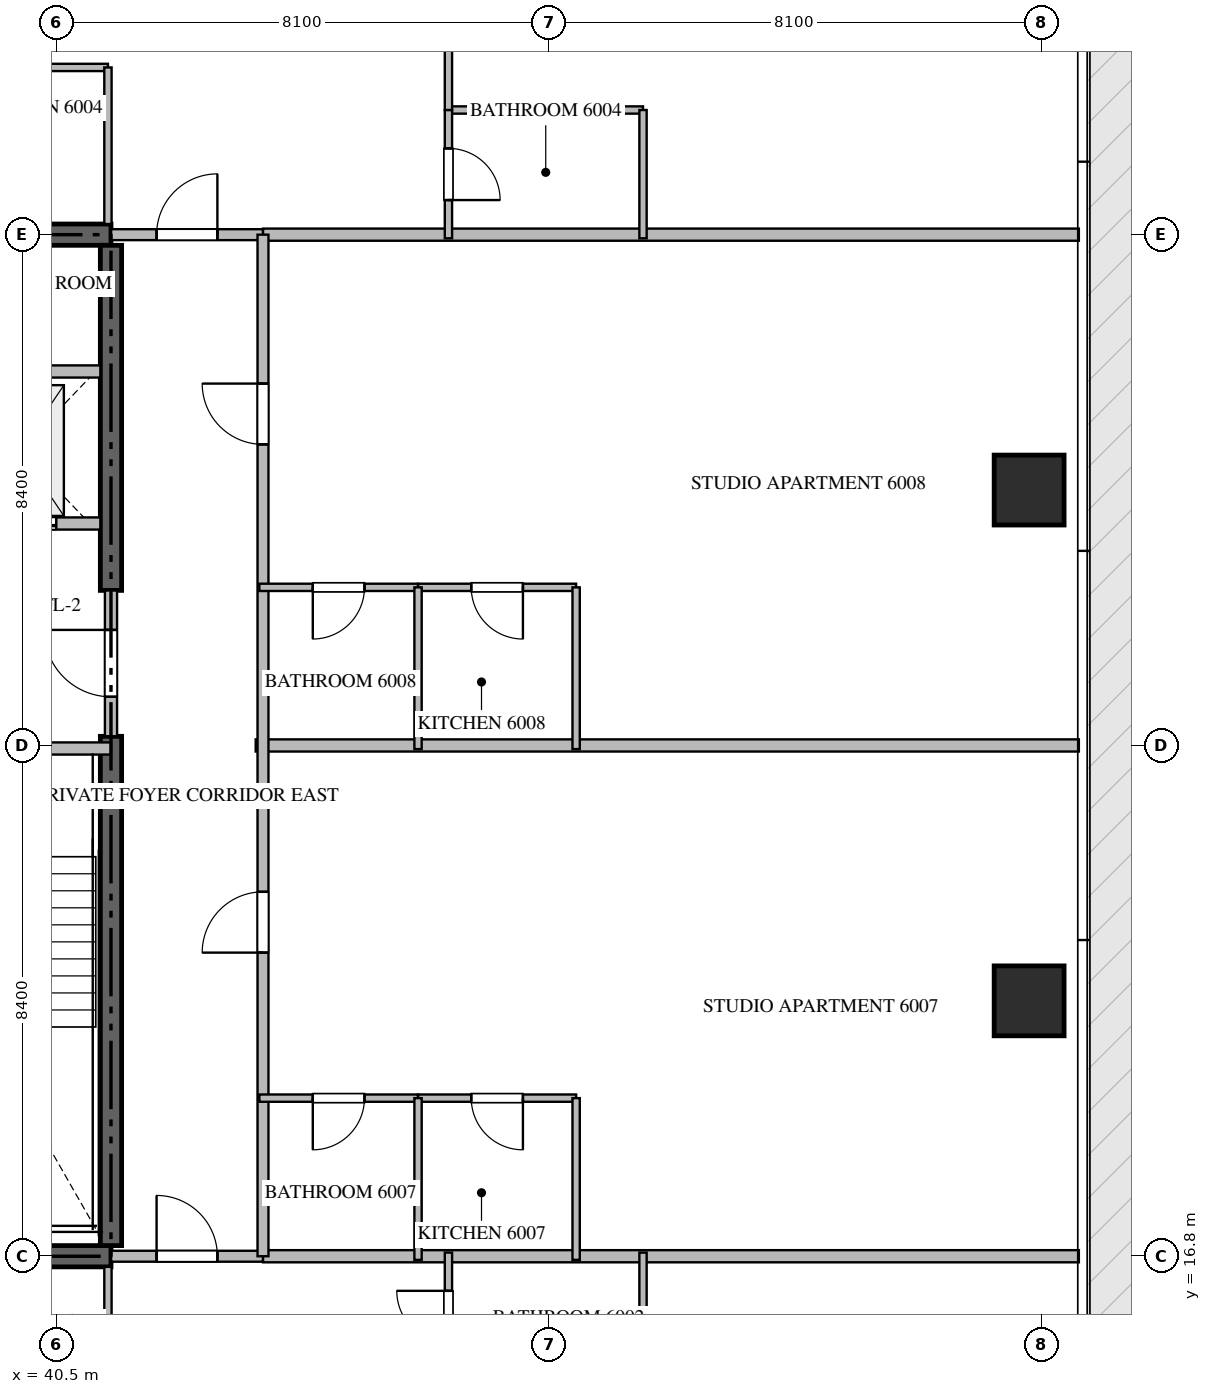
"""IFC4 building model, lengths in metres.
Left out: names, types, materials, properties, quantities, classifications, styles, units other than length and angle.
Written with IfcOpenShell. Run it as: python <this file> out.ifc"""

import sys

from ifc_helpers import new_model, si_unit, direction, frame, frame_2d, origin, origin_2d, place, context, subcontext, project, spatial, rectangle, extrude, source, transform, mapped, element, fill, save


model = new_model("IFC4")
c1 = context("Model", 3, precision=1e-05, world=origin(), true_north=direction((0.0, 1.0)))
c2 = subcontext(c1, "Body", "Model", "MODEL_VIEW")
j1 = project(units=[si_unit("LENGTHUNIT", "METRE"), si_unit("PLANEANGLEUNIT", "RADIAN")], contexts=[c1])
p1 = place(None, origin())
s1 = spatial("IfcSite", under=j1, at=p1, CompositionType="ELEMENT")
p2 = place(p1, origin())
s2 = spatial("IfcBuilding", under=s1, at=p2, CompositionType="ELEMENT")
p3 = place(p2, frame((0.0, 0.0, 241.25)))
s3 = spatial("IfcBuildingStorey", under=s2, at=p3, CompositionType="ELEMENT", Elevation=241.25)
for number, where, z_axis, x_axis in (
    (1, (23.4, 16.8, -0.26), (0.0, 0.0, 1.0), (1.0, 0.0, 0.0)),
    (2, (41.4, 33.6, -0.26), (0.0, 0.0, 1.0), (-1.0, 0.0, 0.0)),
):
    element("IfcWall", number, at=place(p3, frame(where, z_axis=z_axis, x_axis=x_axis)), inside=s3, PredefinedType="SHEAR", context=c2, shape_type="SweptSolid", body=[
        extrude(rectangle(XDim=18.0, YDim=0.35, at=frame_2d((9.0, 0.0))), origin(), (0.0, 0.0, 1.0), 3.848),
    ])
p4 = place(p3, frame((41.4, 16.975, -0.26), z_axis=(0.0, 0.0, 1.0), x_axis=(0.0, 1.0, 0.0)))
e3 = element("IfcWall", 3, at=p4, inside=s3, PredefinedType="SHEAR", context=c2, shape_type="SweptSolid", body=[
    extrude(rectangle(XDim=8.375, YDim=0.35, at=frame_2d((4.188, 0.0))), origin(), (0.0, 0.0, 1.0), 3.848),
])
p5 = place(p3, frame((41.4, 27.75, -0.26), z_axis=(0.0, 0.0, 1.0), x_axis=(0.0, 1.0, 0.0)))
e4 = element("IfcWall", 4, at=p5, inside=s3, PredefinedType="SHEAR", context=c2, shape_type="SweptSolid", body=[
    extrude(rectangle(XDim=5.675, YDim=0.35, at=frame_2d((2.837, 0.0))), origin(), (0.0, 0.0, 1.0), 3.848),
])
m1 = source(origin(), c2, "Body", "SweptSolid", [
    extrude(rectangle(XDim=1.15, YDim=1.15, at=origin_2d()), origin(), (0.0, 0.0, 1.0), 3.85),
])
for number, where, z_axis, x_axis in (
    (5, (56.5, 21.0, -0.26), (0.0, 0.0, 1.0), (1.0, 0.0, 0.0)),
    (6, (56.5, 29.4, -0.26), (0.0, 0.0, 1.0), (1.0, 0.0, 0.0)),
):
    element("IfcColumn", number, at=place(p3, frame(where, z_axis=z_axis, x_axis=x_axis)), inside=s3, PredefinedType="COLUMN", context=c2, shape_type="MappedRepresentation", body=[
        mapped(m1, transform((0.0, 0.0, 0.0), scale=1.0)),
    ])
p6 = place(p3, frame((36.95, 25.15, 0.0), z_axis=(0.0, 0.0, 1.0), x_axis=(1.0, 0.0, 0.0)))
e7 = element("IfcWall", 7, at=p6, inside=s3, PredefinedType="STANDARD", context=c2, shape_type="SweptSolid", body=[
    extrude(rectangle(XDim=4.45, YDim=0.2, at=frame_2d((2.225, 0.0))), origin(), (0.0, 0.0, 1.0), 3.59),
])
p7 = place(p6, frame((1.65, 0.0, 0.0)))
e8 = element("IfcOpeningElement", 8, at=p7, cuts=e7, PredefinedType="OPENING", context=c2, shape_type="SweptSolid", body=[
    extrude(rectangle(XDim=1.1, YDim=2.15, at=frame_2d((0.55, 1.075))), frame((0.0, 0.11, 0.0), z_axis=(0.0, -1.0, 0.0), x_axis=(1.0, 0.0, 0.0)), (0.0, 0.0, 1.0), 0.22),
])
p8 = place(p3, frame((38.75, 28.85, 0.0), z_axis=(0.0, 0.0, 1.0), x_axis=(1.0, 0.0, 0.0)))
e9 = element("IfcWall", 9, at=p8, inside=s3, PredefinedType="STANDARD", context=c2, shape_type="SweptSolid", body=[
    extrude(rectangle(XDim=2.475, YDim=0.2, at=frame_2d((1.238, 0.0))), origin(), (0.0, 0.0, 1.0), 3.59),
])
p9 = place(p8, frame((0.55, 0.0, 0.0)))
e10 = element("IfcOpeningElement", 10, at=p9, cuts=e9, PredefinedType="OPENING", context=c2, shape_type="SweptSolid", body=[
    extrude(rectangle(XDim=1.2, YDim=2.2, at=frame_2d((0.6, 1.1))), frame((0.0, 0.11, 0.0), z_axis=(0.0, -1.0, 0.0), x_axis=(1.0, 0.0, 0.0)), (0.0, 0.0, 1.0), 0.22),
])
p10 = place(p3, frame((38.75, 31.35, 0.0), z_axis=(0.0, 0.0, 1.0), x_axis=(1.0, 0.0, 0.0)))
e11 = element("IfcWall", 11, at=p10, inside=s3, PredefinedType="STANDARD", context=c2, shape_type="SweptSolid", body=[
    extrude(rectangle(XDim=2.475, YDim=0.2, at=frame_2d((1.238, 0.0))), origin(), (0.0, 0.0, 1.0), 3.59),
])
p11 = place(p3, frame((41.4, 25.352, 0.0), z_axis=(0.0, 0.0, 1.0), x_axis=(0.0, 1.0, 0.0)))
e12 = element("IfcWall", 12, at=p11, inside=s3, PredefinedType="STANDARD", context=c2, shape_type="SweptSolid", body=[
    extrude(rectangle(XDim=2.396, YDim=0.2, at=frame_2d((1.198, 0.0))), origin(), (0.0, 0.0, 1.0), 3.59),
])
p12 = place(p11, frame((0.648, 0.0, 0.0)))
e13 = element("IfcOpeningElement", 13, at=p12, cuts=e12, PredefinedType="OPENING", context=c2, shape_type="SweptSolid", body=[
    extrude(rectangle(XDim=1.1, YDim=2.15, at=frame_2d((0.55, 1.075))), frame((0.0, 0.11, 0.0), z_axis=(0.0, -1.0, 0.0), x_axis=(1.0, 0.0, 0.0)), (0.0, 0.0, 1.0), 0.22),
])
p13 = place(p3, frame((43.78, 25.2, 0.0), z_axis=(0.0, 0.0, 1.0), x_axis=(1.0, 0.0, 0.0)))
e14 = element("IfcWall", 14, at=p13, inside=s3, PredefinedType="PARTITIONING", context=c2, shape_type="SweptSolid", body=[
    extrude(rectangle(XDim=13.538, YDim=0.2, at=frame_2d((6.769, 0.0))), origin(), (0.0, 0.0, 1.0), 3.59),
])
for number, where, z_axis, x_axis in (
    (15, (43.9, 16.8, 0.0), (0.0, 0.0, 1.0), (1.0, 0.0, 0.0)),
    (16, (43.9, 33.6, 0.0), (0.0, 0.0, 1.0), (1.0, 0.0, 0.0)),
):
    element("IfcWall", number, at=place(p3, frame(where, z_axis=z_axis, x_axis=x_axis)), inside=s3, PredefinedType="PARTITIONING", context=c2, shape_type="SweptSolid", body=[
        extrude(rectangle(XDim=13.418, YDim=0.2, at=frame_2d((6.709, 0.0))), origin(), (0.0, 0.0, 1.0), 3.59),
    ])
p14 = place(p3, frame((41.402, 16.8, 0.0), z_axis=(0.0, 0.0, 1.0), x_axis=(1.0, 0.0, 0.0)))
e17 = element("IfcWall", 17, at=p14, inside=s3, PredefinedType="PARTITIONING", context=c2, shape_type="SweptSolid", body=[
    extrude(rectangle(XDim=2.496, YDim=0.18, at=frame_2d((1.248, 0.0))), origin(), (0.0, 0.0, 1.0), 3.59),
])
p15 = place(p14, frame((0.748, 0.0, 0.0)))
e18 = element("IfcOpeningElement", 18, at=p15, cuts=e17, PredefinedType="OPENING", context=c2, shape_type="SweptSolid", body=[
    extrude(rectangle(XDim=1.0, YDim=2.15, at=frame_2d((0.5, 1.075))), frame((0.0, 0.1, 0.0), z_axis=(0.0, -1.0, 0.0), x_axis=(1.0, 0.0, 0.0)), (0.0, 0.0, 1.0), 0.2),
])
p16 = place(p3, frame((41.402, 33.6, 0.0), z_axis=(0.0, 0.0, 1.0), x_axis=(1.0, 0.0, 0.0)))
e19 = element("IfcWall", 19, at=p16, inside=s3, PredefinedType="PARTITIONING", context=c2, shape_type="SweptSolid", body=[
    extrude(rectangle(XDim=2.496, YDim=0.18, at=frame_2d((1.248, 0.0))), origin(), (0.0, 0.0, 1.0), 3.59),
])
p17 = place(p16, frame((0.748, 0.0, 0.0)))
e20 = element("IfcOpeningElement", 20, at=p17, cuts=e19, PredefinedType="OPENING", context=c2, shape_type="SweptSolid", body=[
    extrude(rectangle(XDim=1.0, YDim=2.15, at=frame_2d((0.5, 1.075))), frame((0.0, 0.1, 0.0), z_axis=(0.0, -1.0, 0.0), x_axis=(1.0, 0.0, 0.0)), (0.0, 0.0, 1.0), 0.2),
])
p18 = place(p3, frame((43.9, 16.8, 0.0), z_axis=(0.0, 0.0, 1.0), x_axis=(0.0, 1.0, 0.0)))
e21 = element("IfcWall", 21, at=p18, inside=s3, PredefinedType="PARTITIONING", context=c2, shape_type="SweptSolid", body=[
    extrude(rectangle(XDim=16.8, YDim=0.18, at=frame_2d((8.4, 0.0))), origin(), (0.0, 0.0, 1.0), 3.59),
])
p19 = place(p18, frame((4.993, 0.0, 0.0)))
e22 = element("IfcOpeningElement", 22, at=p19, cuts=e21, PredefinedType="OPENING", context=c2, shape_type="SweptSolid", body=[
    extrude(rectangle(XDim=1.0, YDim=2.15, at=frame_2d((0.5, 1.075))), frame((0.0, 0.1, 0.0), z_axis=(0.0, -1.0, 0.0), x_axis=(1.0, 0.0, 0.0)), (0.0, 0.0, 1.0), 0.2),
])
p20 = place(p18, frame((13.351, 0.0, 0.0)))
e23 = element("IfcOpeningElement", 23, at=p20, cuts=e21, PredefinedType="OPENING", context=c2, shape_type="SweptSolid", body=[
    extrude(rectangle(XDim=1.0, YDim=2.15, at=frame_2d((0.5, 1.075))), frame((0.0, 0.1, 0.0), z_axis=(0.0, -1.0, 0.0), x_axis=(1.0, 0.0, 0.0)), (0.0, 0.0, 1.0), 0.2),
])
p21 = place(p3, frame((41.35, 14.05, 0.0), z_axis=(0.0, 0.0, 1.0), x_axis=(0.0, 1.0, 0.0)))
e24 = element("IfcWall", 24, at=p21, inside=s3, PredefinedType="PARTITIONING", context=c2, shape_type="SweptSolid", body=[
    extrude(rectangle(XDim=2.575, YDim=0.12, at=frame_2d((1.288, 0.0))), origin(), (0.0, 0.0, 1.0), 3.59),
])
p22 = place(p3, frame((50.15, 14.75, 0.0), z_axis=(0.0, 0.0, 1.0), x_axis=(0.0, 1.0, 0.0)))
e25 = element("IfcWall", 25, at=p22, inside=s3, PredefinedType="PARTITIONING", context=c2, shape_type="SweptSolid", body=[
    extrude(rectangle(XDim=2.11, YDim=0.12, at=frame_2d((1.055, 0.0))), origin(), (0.0, 0.0, 1.0), 3.59),
])
p23 = place(p3, frame((46.95, 14.752, 0.0), z_axis=(0.0, 0.0, 1.0), x_axis=(0.0, 1.0, 0.0)))
e26 = element("IfcWall", 26, at=p23, inside=s3, PredefinedType="PARTITIONING", context=c2, shape_type="SweptSolid", body=[
    extrude(rectangle(XDim=2.108, YDim=0.12, at=frame_2d((1.054, 0.0))), origin(), (0.0, 0.0, 1.0), 3.59),
])
p24 = place(p23, frame((0.629, 0.0, 0.0)))
e27 = element("IfcOpeningElement", 27, at=p24, cuts=e26, PredefinedType="OPENING", context=c2, shape_type="SweptSolid", body=[
    extrude(rectangle(XDim=0.85, YDim=2.1, at=frame_2d((0.425, 1.05))), frame((0.0, 0.07, 0.0), z_axis=(0.0, -1.0, 0.0), x_axis=(1.0, 0.0, 0.0)), (0.0, 0.0, 1.0), 0.14),
])
p25 = place(p3, frame((38.5, 36.35, 0.0), z_axis=(0.0, 0.0, 1.0), x_axis=(1.0, 0.0, 0.0)))
e28 = element("IfcWall", 28, at=p25, inside=s3, PredefinedType="PARTITIONING", context=c2, shape_type="SweptSolid", body=[
    extrude(rectangle(XDim=2.85, YDim=0.12, at=frame_2d((1.425, 0.0))), origin(), (0.0, 0.0, 1.0), 3.59),
])
p26 = place(p25, frame((1.0, 0.0, 0.0)))
e29 = element("IfcOpeningElement", 29, at=p26, cuts=e28, PredefinedType="OPENING", context=c2, shape_type="SweptSolid", body=[
    extrude(rectangle(XDim=0.85, YDim=2.1, at=frame_2d((0.425, 1.05))), frame((0.0, 0.07, 0.0), z_axis=(0.0, -1.0, 0.0), x_axis=(1.0, 0.0, 0.0)), (0.0, 0.0, 1.0), 0.14),
])
p27 = place(p3, frame((41.35, 36.35, 0.0), z_axis=(0.0, 0.0, 1.0), x_axis=(0.0, -1.0, 0.0)))
e30 = element("IfcWall", 30, at=p27, inside=s3, PredefinedType="PARTITIONING", context=c2, shape_type="SweptSolid", body=[
    extrude(rectangle(XDim=2.575, YDim=0.12, at=frame_2d((1.288, 0.0))), origin(), (0.0, 0.0, 1.0), 3.59),
])
p28 = place(p3, frame((46.95, 35.65, 0.0), z_axis=(0.0, 0.0, 1.0), x_axis=(1.0, 0.0, 0.0)))
e31 = element("IfcWall", 31, at=p28, inside=s3, PredefinedType="PARTITIONING", context=c2, shape_type="SweptSolid", body=[
    extrude(rectangle(XDim=3.2, YDim=0.12, at=frame_2d((1.6, 0.0))), origin(), (0.0, 0.0, 1.0), 3.59),
])
p29 = place(p3, frame((50.15, 35.65, 0.0), z_axis=(0.0, 0.0, 1.0), x_axis=(0.0, -1.0, 0.0)))
e32 = element("IfcWall", 32, at=p29, inside=s3, PredefinedType="PARTITIONING", context=c2, shape_type="SweptSolid", body=[
    extrude(rectangle(XDim=2.11, YDim=0.12, at=frame_2d((1.055, 0.0))), origin(), (0.0, 0.0, 1.0), 3.59),
])
p30 = place(p3, frame((46.95, 41.73, 0.0), z_axis=(0.0, 0.0, 1.0), x_axis=(0.0, -1.0, 0.0)))
e33 = element("IfcWall", 33, at=p30, inside=s3, PredefinedType="PARTITIONING", context=c2, shape_type="SweptSolid", body=[
    extrude(rectangle(XDim=6.08, YDim=0.12, at=frame_2d((3.04, 0.0))), origin(), (0.0, 0.0, 1.0), 3.59),
])
p31 = place(p30, frame((2.615, 0.0, 0.0)))
e34 = element("IfcOpeningElement", 34, at=p31, cuts=e33, PredefinedType="OPENING", context=c2, shape_type="SweptSolid", body=[
    extrude(rectangle(XDim=0.85, YDim=2.1, at=frame_2d((0.425, 1.05))), frame((0.0, 0.07, 0.0), z_axis=(0.0, -1.0, 0.0), x_axis=(1.0, 0.0, 0.0)), (0.0, 0.0, 1.0), 0.14),
])
p32 = place(p3, frame((46.95, 35.648, 0.0), z_axis=(0.0, 0.0, 1.0), x_axis=(0.0, -1.0, 0.0)))
e35 = element("IfcWall", 35, at=p32, inside=s3, PredefinedType="PARTITIONING", context=c2, shape_type="SweptSolid", body=[
    extrude(rectangle(XDim=2.108, YDim=0.12, at=frame_2d((1.054, 0.0))), origin(), (0.0, 0.0, 1.0), 3.59),
])
p33 = place(p32, frame((0.629, 0.0, 0.0)))
e36 = element("IfcOpeningElement", 36, at=p33, cuts=e35, PredefinedType="OPENING", context=c2, shape_type="SweptSolid", body=[
    extrude(rectangle(XDim=0.85, YDim=2.1, at=frame_2d((0.425, 1.05))), frame((0.0, 0.07, 0.0), z_axis=(0.0, -1.0, 0.0), x_axis=(1.0, 0.0, 0.0)), (0.0, 0.0, 1.0), 0.14),
])
p34 = place(p3, frame((49.05, 19.4, 0.0), z_axis=(0.0, 0.0, 1.0), x_axis=(-1.0, 0.0, 0.0)))
e37 = element("IfcWall", 37, at=p34, inside=s3, PredefinedType="PARTITIONING", context=c2, shape_type="SweptSolid", body=[
    extrude(rectangle(XDim=2.6, YDim=0.12, at=frame_2d((1.3, 0.0))), origin(), (0.0, 0.0, 1.0), 3.59),
])
p35 = place(p34, frame((0.875, 0.0, 0.0)))
e38 = element("IfcOpeningElement", 38, at=p35, cuts=e37, PredefinedType="OPENING", context=c2, shape_type="SweptSolid", body=[
    extrude(rectangle(XDim=0.85, YDim=2.1, at=frame_2d((0.425, 1.05))), frame((0.0, 0.07, 0.0), z_axis=(0.0, -1.0, 0.0), x_axis=(1.0, 0.0, 0.0)), (0.0, 0.0, 1.0), 0.14),
])
p36 = place(p3, frame((46.448, 19.4, 0.0), z_axis=(0.0, 0.0, 1.0), x_axis=(-1.0, 0.0, 0.0)))
e39 = element("IfcWall", 39, at=p36, inside=s3, PredefinedType="PARTITIONING", context=c2, shape_type="SweptSolid", body=[
    extrude(rectangle(XDim=2.608, YDim=0.12, at=frame_2d((1.304, 0.0))), origin(), (0.0, 0.0, 1.0), 3.59),
])
p37 = place(p36, frame((0.879, 0.0, 0.0)))
e40 = element("IfcOpeningElement", 40, at=p37, cuts=e39, PredefinedType="OPENING", context=c2, shape_type="SweptSolid", body=[
    extrude(rectangle(XDim=0.85, YDim=2.1, at=frame_2d((0.425, 1.05))), frame((0.0, 0.07, 0.0), z_axis=(0.0, -1.0, 0.0), x_axis=(1.0, 0.0, 0.0)), (0.0, 0.0, 1.0), 0.14),
])
for number, where, z_axis, x_axis in (
    (41, (46.45, 16.74, 0.0), (0.0, 0.0, 1.0), (0.0, 1.0, 0.0)),
    (42, (49.05, 16.74, 0.0), (0.0, 0.0, 1.0), (0.0, 1.0, 0.0)),
):
    element("IfcWall", number, at=place(p3, frame(where, z_axis=z_axis, x_axis=x_axis)), inside=s3, PredefinedType="PARTITIONING", context=c2, shape_type="SweptSolid", body=[
        extrude(rectangle(XDim=2.66, YDim=0.12, at=frame_2d((1.33, 0.0))), origin(), (0.0, 0.0, 1.0), 3.59),
    ])
p38 = place(p3, frame((49.05, 27.8, 0.0), z_axis=(0.0, 0.0, 1.0), x_axis=(-1.0, 0.0, 0.0)))
e43 = element("IfcWall", 43, at=p38, inside=s3, PredefinedType="PARTITIONING", context=c2, shape_type="SweptSolid", body=[
    extrude(rectangle(XDim=2.6, YDim=0.12, at=frame_2d((1.3, 0.0))), origin(), (0.0, 0.0, 1.0), 3.59),
])
p39 = place(p38, frame((0.875, 0.0, 0.0)))
e44 = element("IfcOpeningElement", 44, at=p39, cuts=e43, PredefinedType="OPENING", context=c2, shape_type="SweptSolid", body=[
    extrude(rectangle(XDim=0.85, YDim=2.1, at=frame_2d((0.425, 1.05))), frame((0.0, 0.07, 0.0), z_axis=(0.0, -1.0, 0.0), x_axis=(1.0, 0.0, 0.0)), (0.0, 0.0, 1.0), 0.14),
])
p40 = place(p3, frame((46.448, 27.8, 0.0), z_axis=(0.0, 0.0, 1.0), x_axis=(-1.0, 0.0, 0.0)))
e45 = element("IfcWall", 45, at=p40, inside=s3, PredefinedType="PARTITIONING", context=c2, shape_type="SweptSolid", body=[
    extrude(rectangle(XDim=2.608, YDim=0.12, at=frame_2d((1.304, 0.0))), origin(), (0.0, 0.0, 1.0), 3.59),
])
p41 = place(p40, frame((0.879, 0.0, 0.0)))
e46 = element("IfcOpeningElement", 46, at=p41, cuts=e45, PredefinedType="OPENING", context=c2, shape_type="SweptSolid", body=[
    extrude(rectangle(XDim=0.85, YDim=2.1, at=frame_2d((0.425, 1.05))), frame((0.0, 0.07, 0.0), z_axis=(0.0, -1.0, 0.0), x_axis=(1.0, 0.0, 0.0)), (0.0, 0.0, 1.0), 0.14),
])
for number, where, z_axis, x_axis in (
    (47, (46.45, 25.14, 0.0), (0.0, 0.0, 1.0), (0.0, 1.0, 0.0)),
    (48, (49.05, 25.14, 0.0), (0.0, 0.0, 1.0), (0.0, 1.0, 0.0)),
):
    element("IfcWall", number, at=place(p3, frame(where, z_axis=z_axis, x_axis=x_axis)), inside=s3, PredefinedType="PARTITIONING", context=c2, shape_type="SweptSolid", body=[
        extrude(rectangle(XDim=2.66, YDim=0.12, at=frame_2d((1.33, 0.0))), origin(), (0.0, 0.0, 1.0), 3.59),
    ])
m2 = source(origin(), c2, "Body", "SweptSolid", [
    extrude(rectangle(XDim=1.2, YDim=2.2, at=frame_2d((0.6, 1.1))), frame((0.0, 0.025, 0.0), z_axis=(0.0, -1.0, 0.0), x_axis=(1.0, 0.0, 0.0)), (0.0, 0.0, 1.0), 0.05),
])
p42 = place(p9, origin())
e49 = element("IfcDoor", 49, at=p42, inside=s3, OperationType="DOUBLE_DOOR_SLIDING", PredefinedType="DOOR", context=c2, shape_type="MappedRepresentation", body=[
    mapped(m2, transform((0.0, 0.0, 0.0), scale=1.0)),
])
fill(e10, e49)
m3 = source(origin(), c2, "Body", "SweptSolid", [
    extrude(rectangle(XDim=1.1, YDim=2.15, at=frame_2d((0.55, 1.075))), frame((0.0, 0.025, 0.0), z_axis=(0.0, -1.0, 0.0), x_axis=(1.0, 0.0, 0.0)), (0.0, 0.0, 1.0), 0.05),
])
p43 = place(p12, origin())
e50 = element("IfcDoor", 50, at=p43, inside=s3, OperationType="SINGLE_SWING_RIGHT", PredefinedType="DOOR", context=c2, shape_type="MappedRepresentation", body=[
    mapped(m3, transform((0.0, 0.0, 0.0), scale=1.0)),
])
fill(e13, e50)
m4 = source(origin(), c2, "Body", "SweptSolid", [
    extrude(rectangle(XDim=1.0, YDim=2.15, at=frame_2d((0.5, 1.075))), frame((0.0, 0.025, 0.0), z_axis=(0.0, -1.0, 0.0), x_axis=(1.0, 0.0, 0.0)), (0.0, 0.0, 1.0), 0.05),
])
p44 = place(p15, origin())
e51 = element("IfcDoor", 51, at=p44, inside=s3, OperationType="SINGLE_SWING_LEFT", PredefinedType="DOOR", context=c2, shape_type="MappedRepresentation", body=[
    mapped(m4, transform((0.0, 0.0, 0.0), scale=1.0)),
])
fill(e18, e51)
p45 = place(p17, origin())
e52 = element("IfcDoor", 52, at=p45, inside=s3, OperationType="SINGLE_SWING_RIGHT", PredefinedType="DOOR", context=c2, shape_type="MappedRepresentation", body=[
    mapped(m4, transform((0.0, 0.0, 0.0), scale=1.0)),
])
fill(e20, e52)
p46 = place(p19, origin())
e53 = element("IfcDoor", 53, at=p46, inside=s3, OperationType="SINGLE_SWING_LEFT", PredefinedType="DOOR", context=c2, shape_type="MappedRepresentation", body=[
    mapped(m4, transform((0.0, 0.0, 0.0), scale=1.0)),
])
fill(e22, e53)
p47 = place(p20, origin())
e54 = element("IfcDoor", 54, at=p47, inside=s3, OperationType="SINGLE_SWING_RIGHT", PredefinedType="DOOR", context=c2, shape_type="MappedRepresentation", body=[
    mapped(m4, transform((0.0, 0.0, 0.0), scale=1.0)),
])
fill(e23, e54)
m5 = source(origin(), c2, "Body", "SweptSolid", [
    extrude(rectangle(XDim=0.85, YDim=2.1, at=frame_2d((0.425, 1.05))), frame((0.0, 0.025, 0.0), z_axis=(0.0, -1.0, 0.0), x_axis=(1.0, 0.0, 0.0)), (0.0, 0.0, 1.0), 0.05),
])
p48 = place(p24, origin())
e55 = element("IfcDoor", 55, at=p48, inside=s3, OperationType="SINGLE_SWING_RIGHT", PredefinedType="DOOR", context=c2, shape_type="MappedRepresentation", body=[
    mapped(m5, transform((0.0, 0.0, 0.0), scale=1.0)),
])
fill(e27, e55)
p49 = place(p33, origin())
e56 = element("IfcDoor", 56, at=p49, inside=s3, OperationType="SINGLE_SWING_RIGHT", PredefinedType="DOOR", context=c2, shape_type="MappedRepresentation", body=[
    mapped(m5, transform((0.0, 0.0, 0.0), scale=1.0)),
])
fill(e36, e56)
p50 = place(p35, origin())
e57 = element("IfcDoor", 57, at=p50, inside=s3, OperationType="SINGLE_SWING_LEFT", PredefinedType="DOOR", context=c2, shape_type="MappedRepresentation", body=[
    mapped(m5, transform((0.0, 0.0, 0.0), scale=1.0)),
])
fill(e38, e57)
p51 = place(p37, origin())
e58 = element("IfcDoor", 58, at=p51, inside=s3, OperationType="SINGLE_SWING_RIGHT", PredefinedType="DOOR", context=c2, shape_type="MappedRepresentation", body=[
    mapped(m5, transform((0.0, 0.0, 0.0), scale=1.0)),
])
fill(e40, e58)
p52 = place(p39, origin())
e59 = element("IfcDoor", 59, at=p52, inside=s3, OperationType="SINGLE_SWING_LEFT", PredefinedType="DOOR", context=c2, shape_type="MappedRepresentation", body=[
    mapped(m5, transform((0.0, 0.0, 0.0), scale=1.0)),
])
fill(e44, e59)
p53 = place(p41, origin())
e60 = element("IfcDoor", 60, at=p53, inside=s3, OperationType="SINGLE_SWING_RIGHT", PredefinedType="DOOR", context=c2, shape_type="MappedRepresentation", body=[
    mapped(m5, transform((0.0, 0.0, 0.0), scale=1.0)),
])
fill(e46, e60)
save(model, sys.argv[1])
